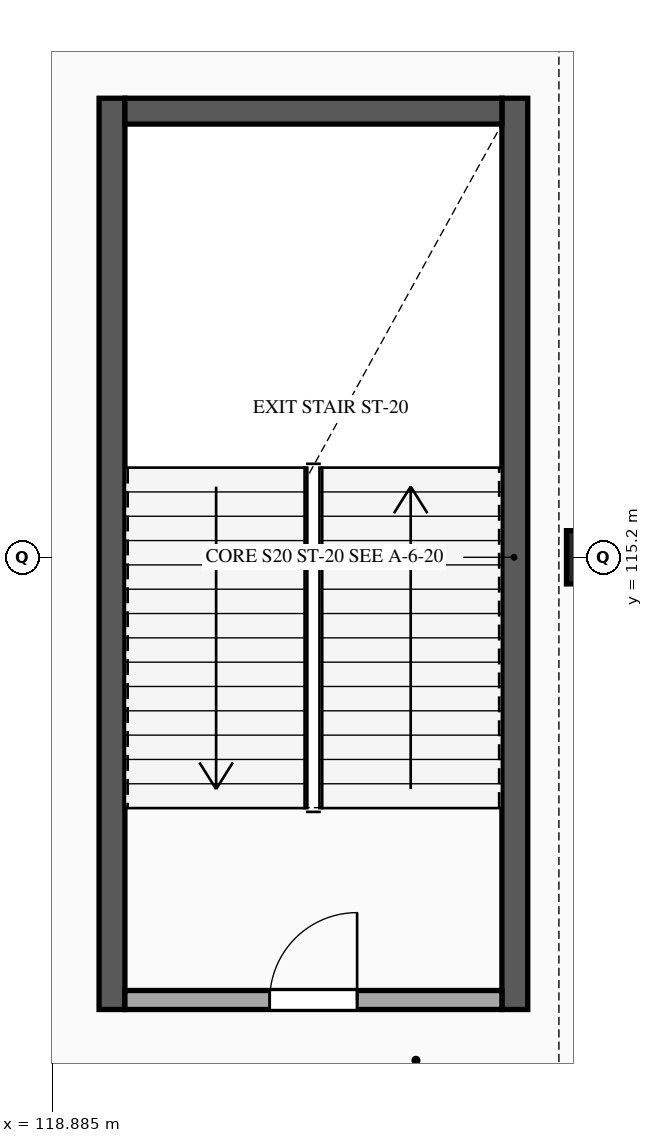
"""IFC4 building model, lengths in metres.
Left out: names, types, materials, properties, quantities, classifications, styles, units other than length and angle.
Written with IfcOpenShell. Run it as: python <this file> out.ifc"""

import sys

from ifc_helpers import new_model, si_unit, direction, frame, frame_2d, origin, origin_2d, place, context, subcontext, project, spatial, rectangle, extrude, element, fill, save


model = new_model("IFC4")
c1 = context("Model", 3, precision=1e-05, world=origin(), true_north=direction((0.0, 1.0)))
c2 = subcontext(c1, "Body", "Model", "MODEL_VIEW")
j1 = project(units=[si_unit("LENGTHUNIT", "METRE"), si_unit("PLANEANGLEUNIT", "RADIAN")], contexts=[c1])
p1 = place(None, origin())
s1 = spatial("IfcSite", under=j1, at=p1, CompositionType="ELEMENT")
p2 = place(p1, origin())
s2 = spatial("IfcBuilding", under=s1, at=p2, CompositionType="ELEMENT")
p3 = place(p2, frame((0.0, 0.0, 10.8)))
s3 = spatial("IfcBuildingStorey", under=s2, at=p3, CompositionType="ELEMENT", Elevation=10.8)
p4 = place(p3, frame((126.0, 115.2, 0.0), z_axis=(0.0, 0.0, 1.0), x_axis=(1.0, 0.0, 0.0)))
e1 = element("IfcColumn", 1, at=p4, inside=s3, PredefinedType="COLUMN", context=c2, shape_type="SweptSolid", body=[
    extrude(rectangle(XDim=0.7, YDim=0.7, at=origin_2d()), origin(), (0.0, 0.0, 1.0), 4.5),
])
for number, where, z_axis, x_axis in (
    (2, (119.67, 109.25, 0.0), (0.0, 0.0, 1.0), (0.0, 1.0, 0.0)),
    (3, (124.97, 121.24, 0.0), (0.0, 0.0, 1.0), (0.0, -1.0, 0.0)),
):
    element("IfcWall", number, at=place(p3, frame(where, z_axis=z_axis, x_axis=x_axis)), inside=s3, PredefinedType="SHEAR", context=c2, shape_type="SweptSolid", body=[
        extrude(rectangle(XDim=11.99, YDim=0.34, at=frame_2d((5.995, 0.0))), origin(), (0.0, 0.0, 1.0), 4.25),
    ])
p5 = place(p3, frame((119.84, 121.07, 0.0), z_axis=(0.0, 0.0, 1.0), x_axis=(1.0, 0.0, 0.0)))
e4 = element("IfcWall", 4, at=p5, inside=s3, PredefinedType="SHEAR", context=c2, shape_type="SweptSolid", body=[
    extrude(rectangle(XDim=4.96, YDim=0.34, at=frame_2d((2.48, 0.0))), origin(), (0.0, 0.0, 1.0), 4.25),
])
p6 = place(p3, frame((119.84, 109.375, 0.0), z_axis=(0.0, 0.0, 1.0), x_axis=(1.0, 0.0, 0.0)))
e5 = element("IfcWall", 5, at=p6, inside=s3, PredefinedType="STANDARD", context=c2, shape_type="SweptSolid", body=[
    extrude(rectangle(XDim=4.96, YDim=0.25, at=frame_2d((2.48, 0.0))), origin(), (0.0, 0.0, 1.0), 4.22),
])
p7 = place(p6, frame((1.905, 0.0, 0.0)))
e6 = element("IfcOpeningElement", 6, at=p7, cuts=e5, PredefinedType="OPENING", context=c2, shape_type="SweptSolid", body=[
    extrude(rectangle(XDim=1.15, YDim=2.2, at=frame_2d((0.575, 1.1))), frame((0.0, 0.135, 0.0), z_axis=(0.0, -1.0, 0.0), x_axis=(1.0, 0.0, 0.0)), (0.0, 0.0, 1.0), 0.27),
])
p8 = place(p7, origin())
e7 = element("IfcDoor", 7, at=p8, inside=s3, OperationType="SINGLE_SWING_RIGHT", PredefinedType="DOOR", context=c2, shape_type="SweptSolid", body=[
    extrude(rectangle(XDim=1.15, YDim=2.2, at=frame_2d((0.575, 1.1))), frame((0.0, 0.025, 0.0), z_axis=(0.0, -1.0, 0.0), x_axis=(1.0, 0.0, 0.0)), (0.0, 0.0, 1.0), 0.05),
])
fill(e6, e7)
save(model, sys.argv[1])
